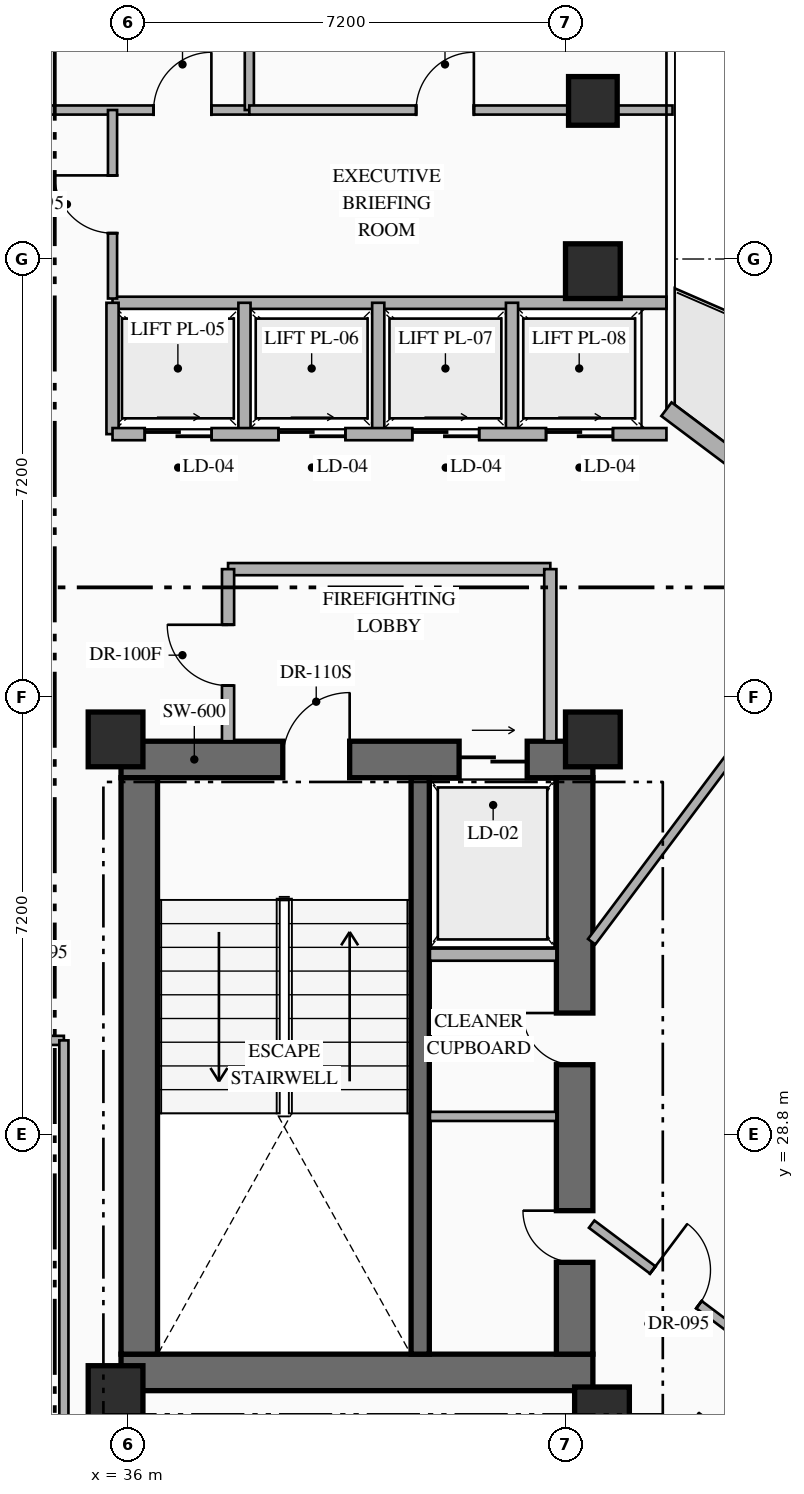
"""IFC4 building model, lengths in metres.
Left out: names, types, materials, properties, quantities, classifications, styles, units other than length and angle.
Written with IfcOpenShell. Run it as: python <this file> out.ifc"""

import sys

from ifc_helpers import new_model, si_unit, direction, frame, frame_2d, origin, origin_2d, place, context, subcontext, project, spatial, rectangle, hollow_rectangle, extrude, element, fill, save


model = new_model("IFC4")
c1 = context("Model", 3, precision=1e-05, world=origin(), true_north=direction((0.0, 1.0)))
c2 = subcontext(c1, "Body", "Model", "MODEL_VIEW")
j1 = project(units=[si_unit("LENGTHUNIT", "METRE"), si_unit("PLANEANGLEUNIT", "RADIAN")], contexts=[c1])
p1 = place(None, origin())
s1 = spatial("IfcSite", under=j1, at=p1, CompositionType="ELEMENT")
p2 = place(p1, origin())
s2 = spatial("IfcBuilding", under=s1, at=p2, CompositionType="ELEMENT")
p3 = place(p2, frame((0.0, 0.0, 163.65)))
s3 = spatial("IfcBuildingStorey", under=s2, at=p3, CompositionType="ELEMENT", Elevation=163.65)
p4 = place(p3, frame((35.89, 24.89, 0.0), z_axis=(0.0, 0.0, 1.0), x_axis=(1.0, 0.0, 0.0)))
e1 = element("IfcWall", 1, at=p4, inside=s3, PredefinedType="SHEAR", context=c2, shape_type="SweptSolid", body=[
    extrude(rectangle(XDim=7.76, YDim=0.6, at=frame_2d((3.88, 0.0))), origin(), (0.0, 0.0, 1.0), 3.6),
])
p5 = place(p3, frame((35.89, 34.97, 0.0), z_axis=(0.0, 0.0, 1.0), x_axis=(1.0, 0.0, 0.0)))
e2 = element("IfcWall", 2, at=p5, inside=s3, PredefinedType="SHEAR", context=c2, shape_type="SweptSolid", body=[
    extrude(rectangle(XDim=7.76, YDim=0.6, at=frame_2d((3.88, 0.0))), origin(), (0.0, 0.0, 1.0), 3.6),
])
p6 = place(p5, frame((2.66, 0.0, 0.0)))
e3 = element("IfcOpeningElement", 3, at=p6, cuts=e2, PredefinedType="OPENING", context=c2, shape_type="SweptSolid", body=[
    extrude(rectangle(XDim=1.1, YDim=2.2, at=frame_2d((0.55, 1.1))), frame((0.0, 0.31, 0.0), z_axis=(0.0, -1.0, 0.0), x_axis=(1.0, 0.0, 0.0)), (0.0, 0.0, 1.0), 0.62),
])
p7 = place(p5, frame((5.56, 0.0, 0.0)))
e4 = element("IfcOpeningElement", 4, at=p7, cuts=e2, PredefinedType="OPENING", context=c2, shape_type="SweptSolid", body=[
    extrude(rectangle(XDim=1.12, YDim=2.15, at=frame_2d((0.56, 1.075))), frame((0.0, 0.31, 0.0), z_axis=(0.0, -1.0, 0.0), x_axis=(1.0, 0.0, 0.0)), (0.0, 0.0, 1.0), 0.62),
])
p8 = place(p3, frame((36.19, 25.19, 0.0), z_axis=(0.0, 0.0, 1.0), x_axis=(0.0, 1.0, 0.0)))
e5 = element("IfcWall", 5, at=p8, inside=s3, PredefinedType="SHEAR", context=c2, shape_type="SweptSolid", body=[
    extrude(rectangle(XDim=9.48, YDim=0.6, at=frame_2d((4.74, 0.0))), origin(), (0.0, 0.0, 1.0), 3.6),
])
p9 = place(p3, frame((43.35, 25.19, 0.0), z_axis=(0.0, 0.0, 1.0), x_axis=(0.0, 1.0, 0.0)))
e6 = element("IfcWall", 6, at=p9, inside=s3, PredefinedType="SHEAR", context=c2, shape_type="SweptSolid", body=[
    extrude(rectangle(XDim=9.48, YDim=0.6, at=frame_2d((4.74, 0.0))), origin(), (0.0, 0.0, 1.0), 3.6),
])
p10 = place(p9, frame((1.51, 0.0, 0.0)))
e7 = element("IfcOpeningElement", 7, at=p10, cuts=e6, PredefinedType="OPENING", context=c2, shape_type="SweptSolid", body=[
    extrude(rectangle(XDim=0.85, YDim=2.08, at=frame_2d((0.425, 1.04))), frame((0.0, 0.31, 0.0), z_axis=(0.0, -1.0, 0.0), x_axis=(1.0, 0.0, 0.0)), (0.0, 0.0, 1.0), 0.62),
])
p11 = place(p9, frame((4.76, 0.0, 0.0)))
e8 = element("IfcOpeningElement", 8, at=p11, cuts=e6, PredefinedType="OPENING", context=c2, shape_type="SweptSolid", body=[
    extrude(rectangle(XDim=0.85, YDim=2.08, at=frame_2d((0.425, 1.04))), frame((0.0, 0.31, 0.0), z_axis=(0.0, -1.0, 0.0), x_axis=(1.0, 0.0, 0.0)), (0.0, 0.0, 1.0), 0.62),
])
p12 = place(p3, frame((40.81, 25.19, 0.0), z_axis=(0.0, 0.0, 1.0), x_axis=(0.0, 1.0, 0.0)))
e9 = element("IfcWall", 9, at=p12, inside=s3, PredefinedType="SHEAR", context=c2, shape_type="SweptSolid", body=[
    extrude(rectangle(XDim=9.48, YDim=0.3, at=frame_2d((4.74, 0.0))), origin(), (0.0, 0.0, 1.0), 3.6),
])
for number, where, z_axis, x_axis in (
    (10, (35.8, 24.55, 0.0), (0.0, 0.0, 1.0), (1.0, 0.0, 0.0)),
    (11, (43.8, 24.2, 0.0), (0.0, 0.0, 1.0), (1.0, 0.0, 0.0)),
    (12, (35.8, 35.3, 0.0), (0.0, 0.0, 1.0), (1.0, 0.0, 0.0)),
    (13, (43.65, 35.3, 0.0), (0.0, 0.0, 1.0), (1.0, 0.0, 0.0)),
    (14, (43.65, 43.0, 0.0), (0.0, 0.0, 1.0), (1.0, 0.0, 0.0)),
):
    element("IfcColumn", number, at=place(p3, frame(where, z_axis=z_axis, x_axis=x_axis)), inside=s3, PredefinedType="COLUMN", context=c2, shape_type="SweptSolid", body=[
        extrude(rectangle(XDim=0.9, YDim=0.9, at=origin_2d()), origin(), (0.0, 0.0, 1.0), 3.6),
    ])
p13 = place(p3, frame((43.65, 45.8, 0.0), z_axis=(0.0, 0.0, 1.0), x_axis=(1.0, 0.0, 0.0)))
e15 = element("IfcColumn", 15, at=p13, inside=s3, PredefinedType="COLUMN", context=c2, shape_type="SweptSolid", body=[
    extrude(hollow_rectangle(XDim=0.8, YDim=0.8, WallThickness=0.032, at=origin_2d()), origin(), (0.0, 0.0, 1.0), 3.6),
])
p14 = place(p3, frame((44.86, 40.73, 0.0), z_axis=(0.0, 0.0, 1.0), x_axis=(0.800007624502, -0.599989833863, 0.0)))
e16 = element("IfcWall", 16, at=p14, inside=s3, PredefinedType="STANDARD", context=c2, shape_type="SweptSolid", body=[
    extrude(rectangle(XDim=19.212, YDim=0.28, at=frame_2d((9.606, 0.0))), origin(), (0.0, 0.0, 1.0), 3.35),
])
p15 = place(p14, frame((1.755, 0.0, 0.0)))
e17 = element("IfcOpeningElement", 17, at=p15, cuts=e16, PredefinedType="OPENING", context=c2, shape_type="SweptSolid", body=[
    extrude(rectangle(XDim=1.1, YDim=2.2, at=frame_2d((0.55, 1.1))), frame((0.0, 0.15, 0.0), z_axis=(0.0, -1.0, 0.0), x_axis=(1.0, 0.0, 0.0)), (0.0, 0.0, 1.0), 0.3),
])
p16 = place(p14, frame((13.509, 0.0, 0.85)))
e18 = element("IfcOpeningElement", 18, at=p16, cuts=e16, PredefinedType="OPENING", context=c2, shape_type="SweptSolid", body=[
    extrude(rectangle(XDim=1.8, YDim=2.1, at=frame_2d((0.9, 1.05))), frame((0.0, 0.15, 0.0), z_axis=(0.0, -1.0, 0.0), x_axis=(1.0, 0.0, 0.0)), (0.0, 0.0, 1.0), 0.3),
])
p17 = place(p3, frame((40.97, 31.76, 0.0), z_axis=(0.0, 0.0, 1.0), x_axis=(1.0, 0.0, 0.0)))
e19 = element("IfcWall", 19, at=p17, inside=s3, PredefinedType="STANDARD", context=c2, shape_type="SweptSolid", body=[
    extrude(rectangle(XDim=2.08, YDim=0.2, at=frame_2d((1.04, 0.0))), origin(), (0.0, 0.0, 1.0), 3.35),
])
p18 = place(p3, frame((40.97, 29.1, 0.0), z_axis=(0.0, 0.0, 1.0), x_axis=(1.0, 0.0, 0.0)))
e20 = element("IfcWall", 20, at=p18, inside=s3, PredefinedType="PARTITIONING", context=c2, shape_type="SweptSolid", body=[
    extrude(rectangle(XDim=2.08, YDim=0.15, at=frame_2d((1.04, 0.0))), origin(), (0.0, 0.0, 1.0), 3.35),
])
p19 = place(p3, frame((37.65, 38.1, 0.0), z_axis=(0.0, 0.0, 1.0), x_axis=(1.0, 0.0, 0.0)))
e21 = element("IfcWall", 21, at=p19, inside=s3, PredefinedType="STANDARD", context=c2, shape_type="SweptSolid", body=[
    extrude(rectangle(XDim=5.3, YDim=0.2, at=frame_2d((2.65, 0.0))), origin(), (0.0, 0.0, 1.0), 3.35),
])
p20 = place(p3, frame((42.95, 35.27, 0.0), z_axis=(0.0, 0.0, 1.0), x_axis=(0.0, 1.0, 0.0)))
e22 = element("IfcWall", 22, at=p20, inside=s3, PredefinedType="STANDARD", context=c2, shape_type="SweptSolid", body=[
    extrude(rectangle(XDim=2.83, YDim=0.2, at=frame_2d((1.415, 0.0))), origin(), (0.0, 0.0, 1.0), 3.35),
])
p21 = place(p3, frame((37.65, 35.27, 0.0), z_axis=(0.0, 0.0, 1.0), x_axis=(0.0, 1.0, 0.0)))
e23 = element("IfcWall", 23, at=p21, inside=s3, PredefinedType="STANDARD", context=c2, shape_type="SweptSolid", body=[
    extrude(rectangle(XDim=2.83, YDim=0.2, at=frame_2d((1.415, 0.0))), origin(), (0.0, 0.0, 1.0), 3.35),
])
p22 = place(p21, frame((0.915, 0.0, 0.0)))
e24 = element("IfcOpeningElement", 24, at=p22, cuts=e23, PredefinedType="OPENING", context=c2, shape_type="SweptSolid", body=[
    extrude(rectangle(XDim=1.0, YDim=2.2, at=frame_2d((0.5, 1.1))), frame((0.0, 0.11, 0.0), z_axis=(0.0, -1.0, 0.0), x_axis=(1.0, 0.0, 0.0)), (0.0, 0.0, 1.0), 0.22),
])
p23 = place(p3, frame((35.75, 42.48, 0.0), z_axis=(0.0, 0.0, 1.0), x_axis=(1.0, 0.0, 0.0)))
e25 = element("IfcWall", 25, at=p23, inside=s3, PredefinedType="STANDARD", context=c2, shape_type="SweptSolid", body=[
    extrude(rectangle(XDim=9.11, YDim=0.2, at=frame_2d((4.555, 0.0))), origin(), (0.0, 0.0, 1.0), 3.35),
])
for number, where, z_axis, x_axis in (
    (26, (35.75, 40.32, 0.0), (0.0, 0.0, 1.0), (0.0, 1.0, 0.0)),
    (27, (37.92, 40.32, 0.0), (0.0, 0.0, 1.0), (0.0, 1.0, 0.0)),
    (28, (40.12, 40.32, 0.0), (0.0, 0.0, 1.0), (0.0, 1.0, 0.0)),
    (29, (42.32, 40.32, 0.0), (0.0, 0.0, 1.0), (0.0, 1.0, 0.0)),
):
    element("IfcWall", number, at=place(p3, frame(where, z_axis=z_axis, x_axis=x_axis)), inside=s3, PredefinedType="STANDARD", context=c2, shape_type="SweptSolid", body=[
        extrude(rectangle(XDim=2.16, YDim=0.2, at=frame_2d((1.08, 0.0))), origin(), (0.0, 0.0, 1.0), 3.35),
    ])
p24 = place(p3, frame((35.75, 40.32, 0.0), z_axis=(0.0, 0.0, 1.0), x_axis=(1.0, 0.0, 0.0)))
e30 = element("IfcWall", 30, at=p24, inside=s3, PredefinedType="STANDARD", context=c2, shape_type="SweptSolid", body=[
    extrude(rectangle(XDim=9.11, YDim=0.2, at=frame_2d((4.555, 0.0))), origin(), (0.0, 0.0, 1.0), 3.35),
])
p25 = place(p24, frame((0.53, 0.0, 0.0)))
e31 = element("IfcOpeningElement", 31, at=p25, cuts=e30, PredefinedType="OPENING", context=c2, shape_type="SweptSolid", body=[
    extrude(rectangle(XDim=1.1, YDim=2.18, at=frame_2d((0.55, 1.09))), frame((0.0, 0.11, 0.0), z_axis=(0.0, -1.0, 0.0), x_axis=(1.0, 0.0, 0.0)), (0.0, 0.0, 1.0), 0.22),
])
p26 = place(p24, frame((2.73, 0.0, 0.0)))
e32 = element("IfcOpeningElement", 32, at=p26, cuts=e30, PredefinedType="OPENING", context=c2, shape_type="SweptSolid", body=[
    extrude(rectangle(XDim=1.1, YDim=2.18, at=frame_2d((0.55, 1.09))), frame((0.0, 0.11, 0.0), z_axis=(0.0, -1.0, 0.0), x_axis=(1.0, 0.0, 0.0)), (0.0, 0.0, 1.0), 0.22),
])
p27 = place(p24, frame((4.93, 0.0, 0.0)))
e33 = element("IfcOpeningElement", 33, at=p27, cuts=e30, PredefinedType="OPENING", context=c2, shape_type="SweptSolid", body=[
    extrude(rectangle(XDim=1.1, YDim=2.18, at=frame_2d((0.55, 1.09))), frame((0.0, 0.11, 0.0), z_axis=(0.0, -1.0, 0.0), x_axis=(1.0, 0.0, 0.0)), (0.0, 0.0, 1.0), 0.22),
])
p28 = place(p24, frame((7.13, 0.0, 0.0)))
e34 = element("IfcOpeningElement", 34, at=p28, cuts=e30, PredefinedType="OPENING", context=c2, shape_type="SweptSolid", body=[
    extrude(rectangle(XDim=1.1, YDim=2.18, at=frame_2d((0.55, 1.09))), frame((0.0, 0.11, 0.0), z_axis=(0.0, -1.0, 0.0), x_axis=(1.0, 0.0, 0.0)), (0.0, 0.0, 1.0), 0.22),
])
p29 = place(p3, frame((30.5, 30.35, 0.0), z_axis=(0.0, 0.0, 1.0), x_axis=(1.0, 0.0, 0.0)))
e35 = element("IfcWall", 35, at=p29, inside=s3, PredefinedType="PARTITIONING", context=c2, shape_type="SweptSolid", body=[
    extrude(rectangle(XDim=4.45, YDim=0.15, at=frame_2d((2.225, 0.0))), origin(), (0.0, 0.0, 1.0), 3.35),
])
p30 = place(p29, frame((2.846, 0.0, 0.0)))
e36 = element("IfcOpeningElement", 36, at=p30, cuts=e35, PredefinedType="OPENING", context=c2, shape_type="SweptSolid", body=[
    extrude(rectangle(XDim=0.95, YDim=2.15, at=frame_2d((0.475, 1.075))), frame((0.0, 0.085, 0.0), z_axis=(0.0, -1.0, 0.0), x_axis=(1.0, 0.0, 0.0)), (0.0, 0.0, 1.0), 0.17),
])
p31 = place(p3, frame((34.95, 23.2, 0.0), z_axis=(0.0, 0.0, 1.0), x_axis=(0.0, 1.0, 0.0)))
e37 = element("IfcWall", 37, at=p31, inside=s3, PredefinedType="PARTITIONING", context=c2, shape_type="SweptSolid", body=[
    extrude(rectangle(XDim=7.15, YDim=0.15, at=frame_2d((3.575, 0.0))), origin(), (0.0, 0.0, 1.0), 3.35),
])
p32 = place(p3, frame((31.4, 45.65, 0.0), z_axis=(0.0, 0.0, 1.0), x_axis=(1.0, 0.0, 0.0)))
e38 = element("IfcWall", 38, at=p32, inside=s3, PredefinedType="PARTITIONING", context=c2, shape_type="SweptSolid", body=[
    extrude(rectangle(XDim=6.6, YDim=0.15, at=frame_2d((3.3, 0.0))), origin(), (0.0, 0.0, 1.0), 2.695),
])
p33 = place(p32, frame((5.026, 0.0, 0.0)))
e39 = element("IfcOpeningElement", 39, at=p33, cuts=e38, PredefinedType="OPENING", context=c2, shape_type="SweptSolid", body=[
    extrude(rectangle(XDim=0.95, YDim=2.15, at=frame_2d((0.475, 1.075))), frame((0.0, 0.085, 0.0), z_axis=(0.0, -1.0, 0.0), x_axis=(1.0, 0.0, 0.0)), (0.0, 0.0, 1.0), 0.17),
])
p34 = place(p3, frame((38.0, 45.65, 0.0), z_axis=(0.0, 0.0, 1.0), x_axis=(0.0, 1.0, 0.0)))
e40 = element("IfcWall", 40, at=p34, inside=s3, PredefinedType="PARTITIONING", context=c2, shape_type="SweptSolid", body=[
    extrude(rectangle(XDim=4.71, YDim=0.15, at=frame_2d((2.355, 0.0))), origin(), (0.0, 0.0, 1.0), 3.35),
])
p35 = place(p3, frame((38.0, 45.65, 0.0), z_axis=(0.0, 0.0, 1.0), x_axis=(1.0, 0.0, 0.0)))
e41 = element("IfcWall", 41, at=p35, inside=s3, PredefinedType="PARTITIONING", context=c2, shape_type="SweptSolid", body=[
    extrude(rectangle(XDim=6.96, YDim=0.15, at=frame_2d((3.48, 0.0))), origin(), (0.0, 0.0, 1.0), 2.695),
])
p36 = place(p35, frame((2.743, 0.0, 0.0)))
e42 = element("IfcOpeningElement", 42, at=p36, cuts=e41, PredefinedType="OPENING", context=c2, shape_type="SweptSolid", body=[
    extrude(rectangle(XDim=0.95, YDim=2.15, at=frame_2d((0.475, 1.075))), frame((0.0, 0.085, 0.0), z_axis=(0.0, -1.0, 0.0), x_axis=(1.0, 0.0, 0.0)), (0.0, 0.0, 1.0), 0.17),
])
p37 = place(p3, frame((44.36, 21.28, 0.0), z_axis=(0.0, 0.0, 1.0), x_axis=(0.6, 0.8, 0.0)))
e43 = element("IfcWall", 43, at=p37, inside=s3, PredefinedType="PARTITIONING", context=c2, shape_type="SweptSolid", body=[
    extrude(rectangle(XDim=5.0, YDim=0.15, at=frame_2d((2.5, 0.0))), origin(), (0.0, 0.0, 1.0), 3.35),
])
p38 = place(p37, frame((2.025, 0.0, 0.0)))
e44 = element("IfcOpeningElement", 44, at=p38, cuts=e43, PredefinedType="OPENING", context=c2, shape_type="SweptSolid", body=[
    extrude(rectangle(XDim=0.95, YDim=2.15, at=frame_2d((0.475, 1.075))), frame((0.0, 0.085, 0.0), z_axis=(0.0, -1.0, 0.0), x_axis=(1.0, 0.0, 0.0)), (0.0, 0.0, 1.0), 0.17),
])
p39 = place(p3, frame((43.63, 27.328, 0.0), z_axis=(0.0, 0.0, 1.0), x_axis=(0.799972182084, -0.600037088764, 0.0)))
e45 = element("IfcWall", 45, at=p39, inside=s3, PredefinedType="PARTITIONING", context=c2, shape_type="SweptSolid", body=[
    extrude(rectangle(XDim=4.213, YDim=0.15, at=frame_2d((2.106, 0.0))), origin(), (0.0, 0.0, 1.0), 3.045),
])
p40 = place(p39, frame((1.256, 0.0, 0.0)))
e46 = element("IfcOpeningElement", 46, at=p40, cuts=e45, PredefinedType="OPENING", context=c2, shape_type="SweptSolid", body=[
    extrude(rectangle(XDim=0.95, YDim=2.15, at=frame_2d((0.475, 1.075))), frame((0.0, 0.085, 0.0), z_axis=(0.0, -1.0, 0.0), x_axis=(1.0, 0.0, 0.0)), (0.0, 0.0, 1.0), 0.17),
])
p41 = place(p3, frame((43.63, 31.973, 0.0), z_axis=(0.0, 0.0, 1.0), x_axis=(0.599975099311, 0.800018674911, 0.0)))
e47 = element("IfcWall", 47, at=p41, inside=s3, PredefinedType="PARTITIONING", context=c2, shape_type="SweptSolid", body=[
    extrude(rectangle(XDim=7.844, YDim=0.15, at=frame_2d((3.922, 0.0))), origin(), (0.0, 0.0, 1.0), 3.35),
])
p42 = place(p3, frame((35.75, 42.55, 0.0), z_axis=(0.0, 0.0, 1.0), x_axis=(0.0, 1.0, 0.0)))
e48 = element("IfcWall", 48, at=p42, inside=s3, PredefinedType="PARTITIONING", context=c2, shape_type="SweptSolid", body=[
    extrude(rectangle(XDim=3.1, YDim=0.15, at=frame_2d((1.55, 0.0))), origin(), (0.0, 0.0, 1.0), 3.35),
])
p43 = place(p42, frame((1.075, 0.0, 0.0)))
e49 = element("IfcOpeningElement", 49, at=p43, cuts=e48, PredefinedType="OPENING", context=c2, shape_type="SweptSolid", body=[
    extrude(rectangle(XDim=0.95, YDim=2.15, at=frame_2d((0.475, 1.075))), frame((0.0, 0.085, 0.0), z_axis=(0.0, -1.0, 0.0), x_axis=(1.0, 0.0, 0.0)), (0.0, 0.0, 1.0), 0.17),
])
p44 = place(p3, frame((27.91, 26.68, 0.0), z_axis=(0.0, 0.0, 1.0), x_axis=(0.800005938517, -0.599992081896, 0.0)))
e50 = element("IfcWall", 50, at=p44, inside=s3, PredefinedType="PARTITIONING", context=c2, shape_type="SweptSolid", body=[
    extrude(rectangle(XDim=14.8, YDim=0.15, at=frame_2d((7.4, 0.0))), origin(), (0.0, 0.0, 1.0), 3.35),
])
p45 = place(p44, frame((9.281, 0.0, 0.0)))
e51 = element("IfcOpeningElement", 51, at=p45, cuts=e50, PredefinedType="OPENING", context=c2, shape_type="SweptSolid", body=[
    extrude(rectangle(XDim=0.95, YDim=2.15, at=frame_2d((0.475, 1.075))), frame((0.0, 0.085, 0.0), z_axis=(0.0, -1.0, 0.0), x_axis=(1.0, 0.0, 0.0)), (0.0, 0.0, 1.0), 0.17),
])
p46 = place(p6, origin())
e52 = element("IfcDoor", 52, at=p46, inside=s3, OperationType="SINGLE_SWING_RIGHT", PredefinedType="DOOR", context=c2, shape_type="SweptSolid", body=[
    extrude(rectangle(XDim=1.1, YDim=2.2, at=frame_2d((0.55, 1.1))), frame((0.0, 0.025, 0.0), z_axis=(0.0, -1.0, 0.0), x_axis=(1.0, 0.0, 0.0)), (0.0, 0.0, 1.0), 0.05),
])
fill(e3, e52)
p47 = place(p7, origin())
e53 = element("IfcDoor", 53, at=p47, inside=s3, OperationType="SLIDING_TO_RIGHT", PredefinedType="USERDEFINED", context=c2, shape_type="SweptSolid", body=[
    extrude(rectangle(XDim=1.12, YDim=2.15, at=frame_2d((0.56, 1.075))), frame((0.0, 0.025, 0.0), z_axis=(0.0, -1.0, 0.0), x_axis=(1.0, 0.0, 0.0)), (0.0, 0.0, 1.0), 0.05),
])
fill(e4, e53)
p48 = place(p10, origin())
e54 = element("IfcDoor", 54, at=p48, inside=s3, OperationType="SINGLE_SWING_RIGHT", PredefinedType="DOOR", context=c2, shape_type="SweptSolid", body=[
    extrude(rectangle(XDim=0.85, YDim=2.08, at=frame_2d((0.425, 1.04))), frame((0.0, 0.025, 0.0), z_axis=(0.0, -1.0, 0.0), x_axis=(1.0, 0.0, 0.0)), (0.0, 0.0, 1.0), 0.05),
])
fill(e7, e54)
p49 = place(p11, origin())
e55 = element("IfcDoor", 55, at=p49, inside=s3, OperationType="SINGLE_SWING_RIGHT", PredefinedType="DOOR", context=c2, shape_type="SweptSolid", body=[
    extrude(rectangle(XDim=0.85, YDim=2.08, at=frame_2d((0.425, 1.04))), frame((0.0, 0.025, 0.0), z_axis=(0.0, -1.0, 0.0), x_axis=(1.0, 0.0, 0.0)), (0.0, 0.0, 1.0), 0.05),
])
fill(e8, e55)
p50 = place(p22, origin())
e56 = element("IfcDoor", 56, at=p50, inside=s3, OperationType="SINGLE_SWING_RIGHT", PredefinedType="DOOR", context=c2, shape_type="SweptSolid", body=[
    extrude(rectangle(XDim=1.0, YDim=2.2, at=frame_2d((0.5, 1.1))), frame((0.0, 0.025, 0.0), z_axis=(0.0, -1.0, 0.0), x_axis=(1.0, 0.0, 0.0)), (0.0, 0.0, 1.0), 0.05),
])
fill(e24, e56)
p51 = place(p25, origin())
e57 = element("IfcDoor", 57, at=p51, inside=s3, OperationType="SLIDING_TO_RIGHT", PredefinedType="USERDEFINED", context=c2, shape_type="SweptSolid", body=[
    extrude(rectangle(XDim=1.1, YDim=2.18, at=frame_2d((0.55, 1.09))), frame((0.0, 0.025, 0.0), z_axis=(0.0, -1.0, 0.0), x_axis=(1.0, 0.0, 0.0)), (0.0, 0.0, 1.0), 0.05),
])
fill(e31, e57)
p52 = place(p26, origin())
e58 = element("IfcDoor", 58, at=p52, inside=s3, OperationType="SLIDING_TO_RIGHT", PredefinedType="USERDEFINED", context=c2, shape_type="SweptSolid", body=[
    extrude(rectangle(XDim=1.1, YDim=2.18, at=frame_2d((0.55, 1.09))), frame((0.0, 0.025, 0.0), z_axis=(0.0, -1.0, 0.0), x_axis=(1.0, 0.0, 0.0)), (0.0, 0.0, 1.0), 0.05),
])
fill(e32, e58)
p53 = place(p27, origin())
e59 = element("IfcDoor", 59, at=p53, inside=s3, OperationType="SLIDING_TO_RIGHT", PredefinedType="USERDEFINED", context=c2, shape_type="SweptSolid", body=[
    extrude(rectangle(XDim=1.1, YDim=2.18, at=frame_2d((0.55, 1.09))), frame((0.0, 0.025, 0.0), z_axis=(0.0, -1.0, 0.0), x_axis=(1.0, 0.0, 0.0)), (0.0, 0.0, 1.0), 0.05),
])
fill(e33, e59)
p54 = place(p28, origin())
e60 = element("IfcDoor", 60, at=p54, inside=s3, OperationType="SLIDING_TO_RIGHT", PredefinedType="USERDEFINED", context=c2, shape_type="SweptSolid", body=[
    extrude(rectangle(XDim=1.1, YDim=2.18, at=frame_2d((0.55, 1.09))), frame((0.0, 0.025, 0.0), z_axis=(0.0, -1.0, 0.0), x_axis=(1.0, 0.0, 0.0)), (0.0, 0.0, 1.0), 0.05),
])
fill(e34, e60)
p55 = place(p33, origin())
e61 = element("IfcDoor", 61, at=p55, inside=s3, OperationType="SINGLE_SWING_RIGHT", PredefinedType="DOOR", context=c2, shape_type="SweptSolid", body=[
    extrude(rectangle(XDim=0.95, YDim=2.15, at=frame_2d((0.475, 1.075))), frame((0.0, 0.025, 0.0), z_axis=(0.0, -1.0, 0.0), x_axis=(1.0, 0.0, 0.0)), (0.0, 0.0, 1.0), 0.05),
])
fill(e39, e61)
p56 = place(p36, origin())
e62 = element("IfcDoor", 62, at=p56, inside=s3, OperationType="SINGLE_SWING_RIGHT", PredefinedType="DOOR", context=c2, shape_type="SweptSolid", body=[
    extrude(rectangle(XDim=0.95, YDim=2.15, at=frame_2d((0.475, 1.075))), frame((0.0, 0.025, 0.0), z_axis=(0.0, -1.0, 0.0), x_axis=(1.0, 0.0, 0.0)), (0.0, 0.0, 1.0), 0.05),
])
fill(e42, e62)
p57 = place(p40, origin())
e63 = element("IfcDoor", 63, at=p57, inside=s3, OperationType="SINGLE_SWING_LEFT", PredefinedType="DOOR", context=c2, shape_type="SweptSolid", body=[
    extrude(rectangle(XDim=0.95, YDim=2.15, at=frame_2d((0.475, 1.075))), frame((0.0, 0.025, 0.0), z_axis=(0.0, -1.0, 0.0), x_axis=(1.0, 0.0, 0.0)), (0.0, 0.0, 1.0), 0.05),
])
fill(e46, e63)
p58 = place(p43, origin())
e64 = element("IfcDoor", 64, at=p58, inside=s3, OperationType="SINGLE_SWING_RIGHT", PredefinedType="DOOR", context=c2, shape_type="SweptSolid", body=[
    extrude(rectangle(XDim=0.95, YDim=2.15, at=frame_2d((0.475, 1.075))), frame((0.0, 0.025, 0.0), z_axis=(0.0, -1.0, 0.0), x_axis=(1.0, 0.0, 0.0)), (0.0, 0.0, 1.0), 0.05),
])
fill(e49, e64)
save(model, sys.argv[1])
